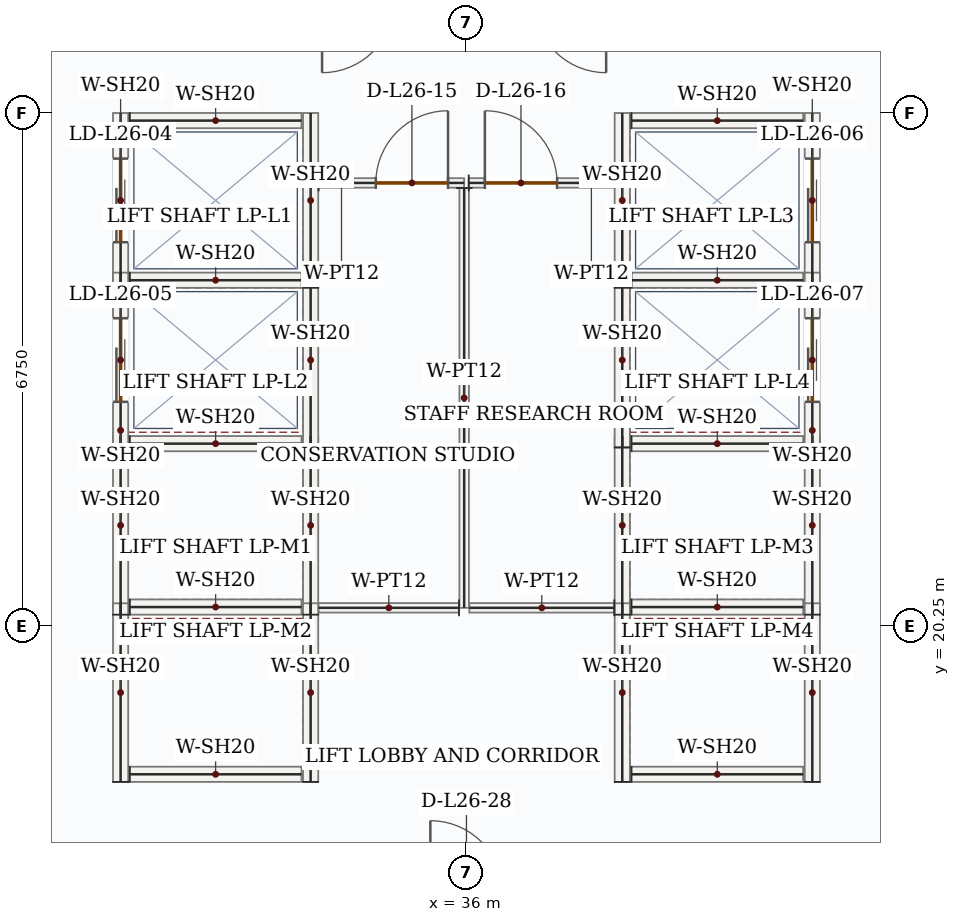
"""IFC4 building model, lengths in metres.
Left out: names, types, materials, properties, quantities, classifications, styles, units other than length and angle.
Written with IfcOpenShell. Run it as: python <this file> out.ifc"""

import sys

from ifc_helpers import new_model, si_unit, direction, frame, frame_2d, origin, place, context, subcontext, project, spatial, rectangle, extrude, source, transform, mapped, element, fill, save


model = new_model("IFC4")
c1 = context("Model", 3, precision=1e-05, world=origin(), true_north=direction((0.0, 1.0)))
c2 = subcontext(c1, "Body", "Model", "MODEL_VIEW")
j1 = project(units=[si_unit("LENGTHUNIT", "METRE"), si_unit("PLANEANGLEUNIT", "RADIAN")], contexts=[c1])
p1 = place(None, origin())
s1 = spatial("IfcSite", under=j1, at=p1, CompositionType="ELEMENT")
p2 = place(p1, origin())
s2 = spatial("IfcBuilding", under=s1, at=p2, CompositionType="ELEMENT")
p3 = place(p2, frame((0.0, 0.0, 117.3)))
s3 = spatial("IfcBuildingStorey", under=s2, at=p3, CompositionType="ELEMENT", Elevation=117.3)
m1 = source(origin(), c2, "Body", "SweptSolid", [
    extrude(rectangle(XDim=2.35, YDim=0.2, at=frame_2d((1.175, 0.0))), origin(), (0.0, 0.0, 1.0), 3.95),
])
for number, where, z_axis, x_axis in (
    (1, (31.45, 20.4, 0.0), (0.0, 0.0, 1.0), (0.0, 1.0, 0.0)),
    (2, (33.95, 20.4, 0.0), (0.0, 0.0, 1.0), (0.0, 1.0, 0.0)),
):
    element("IfcWall", number, at=place(p3, frame(where, z_axis=z_axis, x_axis=x_axis)), inside=s3, PredefinedType="SOLIDWALL", context=c2, shape_type="MappedRepresentation", body=[
        mapped(m1, transform((0.0, 0.0, 0.0), x_axis=(1.0, 0.0, 0.0), y_axis=(0.0, 1.0, 0.0), z_axis=(0.0, 0.0, 1.0), scale=1.0)),
    ])
m2 = source(origin(), c2, "Body", "SweptSolid", [
    extrude(rectangle(XDim=2.26, YDim=0.2, at=frame_2d((1.13, 0.0))), origin(), (0.0, 0.0, 1.0), 3.95),
])
for number, where, z_axis, x_axis in (
    (3, (31.57, 20.5, 0.0), (0.0, 0.0, 1.0), (1.0, 0.0, 0.0)),
    (4, (31.57, 22.65, 0.0), (0.0, 0.0, 1.0), (1.0, 0.0, 0.0)),
):
    element("IfcWall", number, at=place(p3, frame(where, z_axis=z_axis, x_axis=x_axis)), inside=s3, PredefinedType="SOLIDWALL", context=c2, shape_type="MappedRepresentation", body=[
        mapped(m2, transform((0.0, 0.0, 0.0), x_axis=(1.0, 0.0, 0.0), y_axis=(0.0, 1.0, 0.0), z_axis=(0.0, 0.0, 1.0), scale=1.0)),
    ])
for number, where, z_axis, x_axis in (
    (5, (31.45, 18.2, 0.0), (0.0, 0.0, 1.0), (0.0, 1.0, 0.0)),
    (6, (33.95, 18.2, 0.0), (0.0, 0.0, 1.0), (0.0, 1.0, 0.0)),
):
    element("IfcWall", number, at=place(p3, frame(where, z_axis=z_axis, x_axis=x_axis)), inside=s3, PredefinedType="SOLIDWALL", context=c2, shape_type="MappedRepresentation", body=[
        mapped(m1, transform((0.0, 0.0, 0.0), x_axis=(1.0, 0.0, 0.0), y_axis=(0.0, 1.0, 0.0), z_axis=(0.0, 0.0, 1.0), scale=1.0)),
    ])
p4 = place(p3, frame((31.57, 18.3, 0.0), z_axis=(0.0, 0.0, 1.0), x_axis=(1.0, 0.0, 0.0)))
e7 = element("IfcWall", 7, at=p4, inside=s3, PredefinedType="SOLIDWALL", context=c2, shape_type="MappedRepresentation", body=[
    mapped(m2, transform((0.0, 0.0, 0.0), x_axis=(1.0, 0.0, 0.0), y_axis=(0.0, 1.0, 0.0), z_axis=(0.0, 0.0, 1.0), scale=1.0)),
])
for number, where, z_axis, x_axis in (
    (8, (38.05, 20.4, 0.0), (0.0, 0.0, 1.0), (0.0, 1.0, 0.0)),
    (9, (40.55, 20.4, 0.0), (0.0, 0.0, 1.0), (0.0, 1.0, 0.0)),
):
    element("IfcWall", number, at=place(p3, frame(where, z_axis=z_axis, x_axis=x_axis)), inside=s3, PredefinedType="SOLIDWALL", context=c2, shape_type="MappedRepresentation", body=[
        mapped(m1, transform((0.0, 0.0, 0.0), x_axis=(1.0, 0.0, 0.0), y_axis=(0.0, 1.0, 0.0), z_axis=(0.0, 0.0, 1.0), scale=1.0)),
    ])
for number, where, z_axis, x_axis in (
    (10, (38.17, 20.5, 0.0), (0.0, 0.0, 1.0), (1.0, 0.0, 0.0)),
    (11, (38.17, 22.65, 0.0), (0.0, 0.0, 1.0), (1.0, 0.0, 0.0)),
):
    element("IfcWall", number, at=place(p3, frame(where, z_axis=z_axis, x_axis=x_axis)), inside=s3, PredefinedType="SOLIDWALL", context=c2, shape_type="MappedRepresentation", body=[
        mapped(m2, transform((0.0, 0.0, 0.0), x_axis=(1.0, 0.0, 0.0), y_axis=(0.0, 1.0, 0.0), z_axis=(0.0, 0.0, 1.0), scale=1.0)),
    ])
for number, where, z_axis, x_axis in (
    (12, (38.05, 18.2, 0.0), (0.0, 0.0, 1.0), (0.0, 1.0, 0.0)),
    (13, (40.55, 18.2, 0.0), (0.0, 0.0, 1.0), (0.0, 1.0, 0.0)),
):
    element("IfcWall", number, at=place(p3, frame(where, z_axis=z_axis, x_axis=x_axis)), inside=s3, PredefinedType="SOLIDWALL", context=c2, shape_type="MappedRepresentation", body=[
        mapped(m1, transform((0.0, 0.0, 0.0), x_axis=(1.0, 0.0, 0.0), y_axis=(0.0, 1.0, 0.0), z_axis=(0.0, 0.0, 1.0), scale=1.0)),
    ])
p5 = place(p3, frame((38.17, 18.3, 0.0), z_axis=(0.0, 0.0, 1.0), x_axis=(1.0, 0.0, 0.0)))
e14 = element("IfcWall", 14, at=p5, inside=s3, PredefinedType="SOLIDWALL", context=c2, shape_type="MappedRepresentation", body=[
    mapped(m2, transform((0.0, 0.0, 0.0), x_axis=(1.0, 0.0, 0.0), y_axis=(0.0, 1.0, 0.0), z_axis=(0.0, 0.0, 1.0), scale=1.0)),
])
p6 = place(p3, frame((31.45, 24.7, 0.0), z_axis=(0.0, 0.0, 1.0), x_axis=(0.0, 1.0, 0.0)))
e15 = element("IfcWall", 15, at=p6, inside=s3, PredefinedType="SOLIDWALL", context=c2, shape_type="SweptSolid", body=[
    extrude(rectangle(XDim=2.3, YDim=0.2, at=frame_2d((1.15, 0.0))), origin(), (0.0, 0.0, 1.0), 3.95),
])
p7 = place(p6, frame((0.6, 0.0, 0.0)))
e16 = element("IfcOpeningElement", 16, at=p7, cuts=e15, PredefinedType="OPENING", context=c2, shape_type="SweptSolid", body=[
    extrude(rectangle(XDim=1.1, YDim=2.15, at=frame_2d((0.55, 1.075))), frame((0.0, 0.11, 0.0), z_axis=(0.0, -1.0, 0.0), x_axis=(1.0, 0.0, 0.0)), (0.0, 0.0, 1.0), 0.22),
])
m3 = source(origin(), c2, "Body", "SweptSolid", [
    extrude(rectangle(XDim=2.3, YDim=0.2, at=frame_2d((1.15, 0.0))), origin(), (0.0, 0.0, 1.0), 3.95),
])
p8 = place(p3, frame((33.95, 24.7, 0.0), z_axis=(0.0, 0.0, 1.0), x_axis=(0.0, 1.0, 0.0)))
e17 = element("IfcWall", 17, at=p8, inside=s3, PredefinedType="SOLIDWALL", context=c2, shape_type="MappedRepresentation", body=[
    mapped(m3, transform((0.0, 0.0, 0.0), x_axis=(1.0, 0.0, 0.0), y_axis=(0.0, 1.0, 0.0), z_axis=(0.0, 0.0, 1.0), scale=1.0)),
])
for number, where, z_axis, x_axis in (
    (18, (31.57, 24.8, 0.0), (0.0, 0.0, 1.0), (1.0, 0.0, 0.0)),
    (19, (31.57, 26.9, 0.0), (0.0, 0.0, 1.0), (1.0, 0.0, 0.0)),
):
    element("IfcWall", number, at=place(p3, frame(where, z_axis=z_axis, x_axis=x_axis)), inside=s3, PredefinedType="SOLIDWALL", context=c2, shape_type="MappedRepresentation", body=[
        mapped(m2, transform((0.0, 0.0, 0.0), x_axis=(1.0, 0.0, 0.0), y_axis=(0.0, 1.0, 0.0), z_axis=(0.0, 0.0, 1.0), scale=1.0)),
    ])
p9 = place(p3, frame((31.45, 22.6, 0.0), z_axis=(0.0, 0.0, 1.0), x_axis=(0.0, 1.0, 0.0)))
e20 = element("IfcWall", 20, at=p9, inside=s3, PredefinedType="SOLIDWALL", context=c2, shape_type="SweptSolid", body=[
    extrude(rectangle(XDim=2.3, YDim=0.2, at=frame_2d((1.15, 0.0))), origin(), (0.0, 0.0, 1.0), 3.95),
])
p10 = place(p9, frame((0.6, 0.0, 0.0)))
e21 = element("IfcOpeningElement", 21, at=p10, cuts=e20, PredefinedType="OPENING", context=c2, shape_type="SweptSolid", body=[
    extrude(rectangle(XDim=1.1, YDim=2.15, at=frame_2d((0.55, 1.075))), frame((0.0, 0.11, 0.0), z_axis=(0.0, -1.0, 0.0), x_axis=(1.0, 0.0, 0.0)), (0.0, 0.0, 1.0), 0.22),
])
m4 = source(origin(), c2, "Body", "SweptSolid", [
    extrude(rectangle(XDim=2.3, YDim=0.2, at=frame_2d((1.15, 0.0))), origin(), (0.0, 0.0, 1.0), 3.95),
])
p11 = place(p3, frame((33.95, 22.6, 0.0), z_axis=(0.0, 0.0, 1.0), x_axis=(0.0, 1.0, 0.0)))
e22 = element("IfcWall", 22, at=p11, inside=s3, PredefinedType="SOLIDWALL", context=c2, shape_type="MappedRepresentation", body=[
    mapped(m4, transform((0.0, 0.0, 0.0), x_axis=(1.0, 0.0, 0.0), y_axis=(0.0, 1.0, 0.0), z_axis=(0.0, 0.0, 1.0), scale=1.0)),
])
p12 = place(p3, frame((38.05, 24.7, 0.0), z_axis=(0.0, 0.0, 1.0), x_axis=(0.0, 1.0, 0.0)))
e23 = element("IfcWall", 23, at=p12, inside=s3, PredefinedType="SOLIDWALL", context=c2, shape_type="MappedRepresentation", body=[
    mapped(m3, transform((0.0, 0.0, 0.0), x_axis=(1.0, 0.0, 0.0), y_axis=(0.0, 1.0, 0.0), z_axis=(0.0, 0.0, 1.0), scale=1.0)),
])
p13 = place(p3, frame((40.55, 24.7, 0.0), z_axis=(0.0, 0.0, 1.0), x_axis=(0.0, 1.0, 0.0)))
e24 = element("IfcWall", 24, at=p13, inside=s3, PredefinedType="SOLIDWALL", context=c2, shape_type="SweptSolid", body=[
    extrude(rectangle(XDim=2.3, YDim=0.2, at=frame_2d((1.15, 0.0))), origin(), (0.0, 0.0, 1.0), 3.95),
])
p14 = place(p13, frame((0.6, 0.0, 0.0)))
e25 = element("IfcOpeningElement", 25, at=p14, cuts=e24, PredefinedType="OPENING", context=c2, shape_type="SweptSolid", body=[
    extrude(rectangle(XDim=1.1, YDim=2.15, at=frame_2d((0.55, 1.075))), frame((0.0, 0.11, 0.0), z_axis=(0.0, -1.0, 0.0), x_axis=(1.0, 0.0, 0.0)), (0.0, 0.0, 1.0), 0.22),
])
for number, where, z_axis, x_axis in (
    (26, (38.17, 24.8, 0.0), (0.0, 0.0, 1.0), (1.0, 0.0, 0.0)),
    (27, (38.17, 26.9, 0.0), (0.0, 0.0, 1.0), (1.0, 0.0, 0.0)),
):
    element("IfcWall", number, at=place(p3, frame(where, z_axis=z_axis, x_axis=x_axis)), inside=s3, PredefinedType="SOLIDWALL", context=c2, shape_type="MappedRepresentation", body=[
        mapped(m2, transform((0.0, 0.0, 0.0), x_axis=(1.0, 0.0, 0.0), y_axis=(0.0, 1.0, 0.0), z_axis=(0.0, 0.0, 1.0), scale=1.0)),
    ])
p15 = place(p3, frame((38.05, 22.6, 0.0), z_axis=(0.0, 0.0, 1.0), x_axis=(0.0, 1.0, 0.0)))
e28 = element("IfcWall", 28, at=p15, inside=s3, PredefinedType="SOLIDWALL", context=c2, shape_type="MappedRepresentation", body=[
    mapped(m4, transform((0.0, 0.0, 0.0), x_axis=(1.0, 0.0, 0.0), y_axis=(0.0, 1.0, 0.0), z_axis=(0.0, 0.0, 1.0), scale=1.0)),
])
p16 = place(p3, frame((40.55, 22.6, 0.0), z_axis=(0.0, 0.0, 1.0), x_axis=(0.0, 1.0, 0.0)))
e29 = element("IfcWall", 29, at=p16, inside=s3, PredefinedType="SOLIDWALL", context=c2, shape_type="SweptSolid", body=[
    extrude(rectangle(XDim=2.3, YDim=0.2, at=frame_2d((1.15, 0.0))), origin(), (0.0, 0.0, 1.0), 3.95),
])
p17 = place(p16, frame((0.6, 0.0, 0.0)))
e30 = element("IfcOpeningElement", 30, at=p17, cuts=e29, PredefinedType="OPENING", context=c2, shape_type="SweptSolid", body=[
    extrude(rectangle(XDim=1.1, YDim=2.15, at=frame_2d((0.55, 1.075))), frame((0.0, 0.11, 0.0), z_axis=(0.0, -1.0, 0.0), x_axis=(1.0, 0.0, 0.0)), (0.0, 0.0, 1.0), 0.22),
])
p18 = place(p3, frame((34.055, 26.08, 0.0), z_axis=(0.0, 0.0, 1.0), x_axis=(1.0, 0.0, 0.0)))
e31 = element("IfcWall", 31, at=p18, inside=s3, PredefinedType="PARTITIONING", context=c2, shape_type="SweptSolid", body=[
    extrude(rectangle(XDim=1.915, YDim=0.125, at=frame_2d((0.958, 0.0))), origin(), (0.0, 0.0, 1.0), 3.95),
])
p19 = place(p18, frame((0.753, 0.0, 0.0)))
e32 = element("IfcOpeningElement", 32, at=p19, cuts=e31, PredefinedType="OPENING", context=c2, shape_type="SweptSolid", body=[
    extrude(rectangle(XDim=0.95, YDim=2.15, at=frame_2d((0.475, 1.075))), frame((0.0, 0.073, 0.0), z_axis=(0.0, -1.0, 0.0), x_axis=(1.0, 0.0, 0.0)), (0.0, 0.0, 1.0), 0.145),
])
m5 = source(origin(), c2, "Body", "SweptSolid", [
    extrude(rectangle(XDim=5.522, YDim=0.125, at=frame_2d((2.761, 0.0))), origin(), (0.0, 0.0, 1.0), 3.95),
])
p20 = place(p3, frame((35.97, 26.012, 0.0), z_axis=(0.0, 0.0, 1.0), x_axis=(0.0, -1.0, 0.0)))
e33 = element("IfcWall", 33, at=p20, inside=s3, PredefinedType="PARTITIONING", context=c2, shape_type="MappedRepresentation", body=[
    mapped(m5, transform((0.0, 0.0, 0.0), x_axis=(1.0, 0.0, 0.0), y_axis=(0.0, 1.0, 0.0), z_axis=(0.0, 0.0, 1.0), scale=1.0)),
])
m6 = source(origin(), c2, "Body", "SweptSolid", [
    extrude(rectangle(XDim=1.848, YDim=0.125, at=frame_2d((0.924, 0.0))), origin(), (0.0, 0.0, 1.0), 3.95),
])
p21 = place(p3, frame((35.903, 20.49, 0.0), z_axis=(0.0, 0.0, 1.0), x_axis=(-1.0, 0.0, 0.0)))
e34 = element("IfcWall", 34, at=p21, inside=s3, PredefinedType="PARTITIONING", context=c2, shape_type="MappedRepresentation", body=[
    mapped(m6, transform((0.0, 0.0, 0.0), x_axis=(1.0, 0.0, 0.0), y_axis=(0.0, 1.0, 0.0), z_axis=(0.0, 0.0, 1.0), scale=1.0)),
])
p22 = place(p3, frame((36.03, 26.08, 0.0), z_axis=(0.0, 0.0, 1.0), x_axis=(1.0, 0.0, 0.0)))
e35 = element("IfcWall", 35, at=p22, inside=s3, PredefinedType="PARTITIONING", context=c2, shape_type="SweptSolid", body=[
    extrude(rectangle(XDim=1.915, YDim=0.125, at=frame_2d((0.958, 0.0))), origin(), (0.0, 0.0, 1.0), 3.95),
])
p23 = place(p22, frame((0.212, 0.0, 0.0)))
e36 = element("IfcOpeningElement", 36, at=p23, cuts=e35, PredefinedType="OPENING", context=c2, shape_type="SweptSolid", body=[
    extrude(rectangle(XDim=0.95, YDim=2.15, at=frame_2d((0.475, 1.075))), frame((0.0, 0.073, 0.0), z_axis=(0.0, -1.0, 0.0), x_axis=(1.0, 0.0, 0.0)), (0.0, 0.0, 1.0), 0.145),
])
m7 = source(origin(), c2, "Body", "SweptSolid", [
    extrude(rectangle(XDim=1.907, YDim=0.125, at=frame_2d((0.954, 0.0))), origin(), (0.0, 0.0, 1.0), 3.95),
])
p24 = place(p3, frame((37.945, 20.49, 0.0), z_axis=(0.0, 0.0, 1.0), x_axis=(-1.0, 0.0, 0.0)))
e37 = element("IfcWall", 37, at=p24, inside=s3, PredefinedType="PARTITIONING", context=c2, shape_type="MappedRepresentation", body=[
    mapped(m7, transform((0.0, 0.0, 0.0), x_axis=(1.0, 0.0, 0.0), y_axis=(0.0, 1.0, 0.0), z_axis=(0.0, 0.0, 1.0), scale=1.0)),
])
m8 = source(origin(), c2, "Body", "SweptSolid", [
    extrude(rectangle(XDim=1.1, YDim=2.15, at=frame_2d((0.55, 1.075))), frame((0.0, 0.025, 0.0), z_axis=(0.0, -1.0, 0.0), x_axis=(1.0, 0.0, 0.0)), (0.0, 0.0, 1.0), 0.05),
])
p25 = place(p7, origin())
e38 = element("IfcDoor", 38, at=p25, inside=s3, OperationType="DOUBLE_DOOR_SLIDING", PredefinedType="DOOR", context=c2, shape_type="MappedRepresentation", body=[
    mapped(m8, transform((0.0, 0.0, 0.0), x_axis=(1.0, 0.0, 0.0), y_axis=(0.0, 1.0, 0.0), z_axis=(0.0, 0.0, 1.0), scale=1.0)),
])
fill(e16, e38)
p26 = place(p10, origin())
e39 = element("IfcDoor", 39, at=p26, inside=s3, OperationType="DOUBLE_DOOR_SLIDING", PredefinedType="DOOR", context=c2, shape_type="MappedRepresentation", body=[
    mapped(m8, transform((0.0, 0.0, 0.0), x_axis=(1.0, 0.0, 0.0), y_axis=(0.0, 1.0, 0.0), z_axis=(0.0, 0.0, 1.0), scale=1.0)),
])
fill(e21, e39)
p27 = place(p14, origin())
e40 = element("IfcDoor", 40, at=p27, inside=s3, OperationType="DOUBLE_DOOR_SLIDING", PredefinedType="DOOR", context=c2, shape_type="MappedRepresentation", body=[
    mapped(m8, transform((0.0, 0.0, 0.0), x_axis=(1.0, 0.0, 0.0), y_axis=(0.0, 1.0, 0.0), z_axis=(0.0, 0.0, 1.0), scale=1.0)),
])
fill(e25, e40)
p28 = place(p17, origin())
e41 = element("IfcDoor", 41, at=p28, inside=s3, OperationType="DOUBLE_DOOR_SLIDING", PredefinedType="DOOR", context=c2, shape_type="MappedRepresentation", body=[
    mapped(m8, transform((0.0, 0.0, 0.0), x_axis=(1.0, 0.0, 0.0), y_axis=(0.0, 1.0, 0.0), z_axis=(0.0, 0.0, 1.0), scale=1.0)),
])
fill(e30, e41)
m9 = source(origin(), c2, "Body", "SweptSolid", [
    extrude(rectangle(XDim=0.95, YDim=2.15, at=frame_2d((0.475, 1.075))), frame((0.0, 0.025, 0.0), z_axis=(0.0, -1.0, 0.0), x_axis=(1.0, 0.0, 0.0)), (0.0, 0.0, 1.0), 0.05),
])
p29 = place(p19, origin())
e42 = element("IfcDoor", 42, at=p29, inside=s3, OperationType="SINGLE_SWING_RIGHT", PredefinedType="DOOR", context=c2, shape_type="MappedRepresentation", body=[
    mapped(m9, transform((0.0, 0.0, 0.0), x_axis=(1.0, 0.0, 0.0), y_axis=(0.0, 1.0, 0.0), z_axis=(0.0, 0.0, 1.0), scale=1.0)),
])
fill(e32, e42)
p30 = place(p23, origin())
e43 = element("IfcDoor", 43, at=p30, inside=s3, OperationType="SINGLE_SWING_LEFT", PredefinedType="DOOR", context=c2, shape_type="MappedRepresentation", body=[
    mapped(m9, transform((0.0, 0.0, 0.0), x_axis=(1.0, 0.0, 0.0), y_axis=(0.0, 1.0, 0.0), z_axis=(0.0, 0.0, 1.0), scale=1.0)),
])
fill(e36, e43)
save(model, sys.argv[1])
